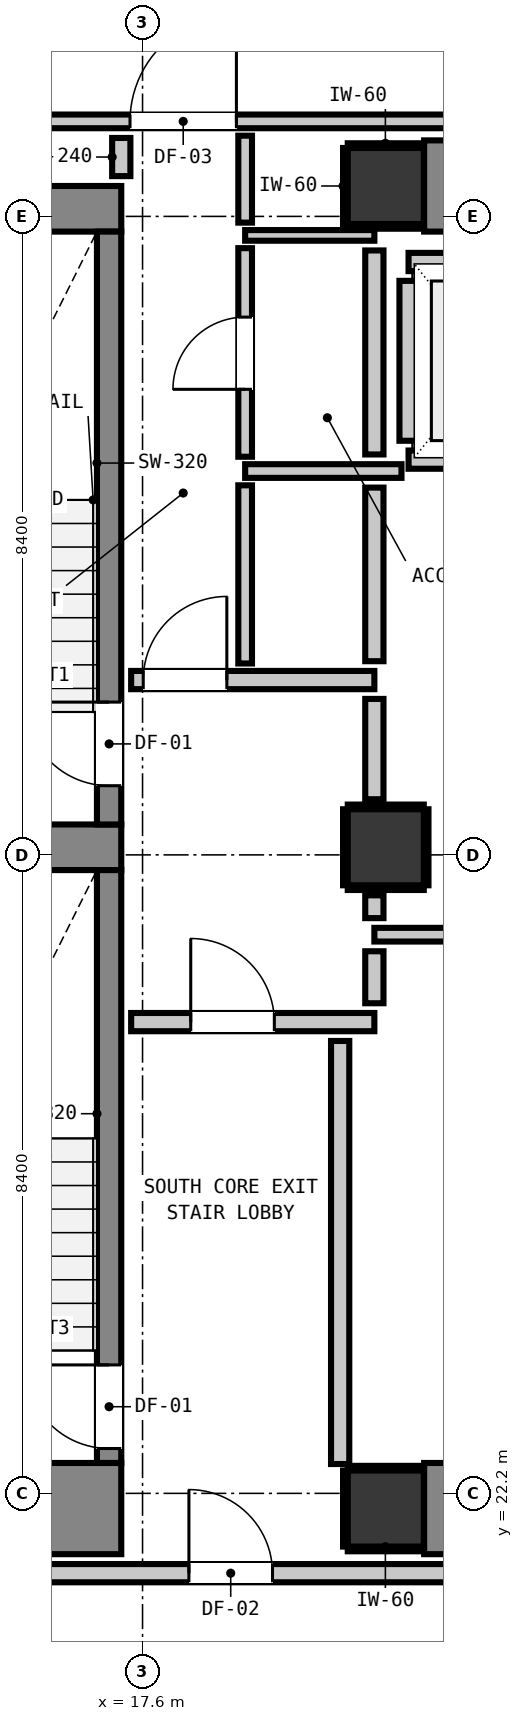
"""IFC4 building model, lengths in metres.
Left out: names, types, materials, properties, quantities, classifications, styles, units other than length and angle.
Written with IfcOpenShell. Run it as: python <this file> out.ifc"""

import sys

from ifc_helpers import new_model, si_unit, direction, frame, frame_2d, origin, origin_2d, place, context, subcontext, project, spatial, rectangle, extrude, element, fill, save


model = new_model("IFC4")
c1 = context("Model", 3, precision=1e-05, world=origin(), true_north=direction((0.0, 1.0)))
c2 = subcontext(c1, "Body", "Model", "MODEL_VIEW")
j1 = project(units=[si_unit("LENGTHUNIT", "METRE"), si_unit("PLANEANGLEUNIT", "RADIAN")], contexts=[c1])
p1 = place(None, origin())
s1 = spatial("IfcSite", under=j1, at=p1, CompositionType="ELEMENT")
p2 = place(p1, origin())
s2 = spatial("IfcBuilding", under=s1, at=p2, CompositionType="ELEMENT")
p3 = place(p2, frame((0.0, 0.0, 58.52)))
s3 = spatial("IfcBuildingStorey", under=s2, at=p3, CompositionType="ELEMENT", Elevation=58.52)
for number, where, z_axis, x_axis in (
    (1, (20.8, 22.0, 0.0), (0.0, 0.0, 1.0), (1.0, 0.0, 0.0)),
    (2, (20.8, 39.4, 0.0), (0.0, 0.0, 1.0), (1.0, 0.0, 0.0)),
):
    element("IfcColumn", number, at=place(p3, frame(where, z_axis=z_axis, x_axis=x_axis)), inside=s3, PredefinedType="COLUMN", context=c2, shape_type="SweptSolid", body=[
        extrude(rectangle(XDim=1.0, YDim=1.0, at=origin_2d()), origin(), (0.0, 0.0, 1.0), 3.32),
    ])
p4 = place(p3, frame((13.24, 22.0, 0.0), z_axis=(0.0, 0.0, 1.0), x_axis=(1.0, 0.0, 0.0)))
e3 = element("IfcWall", 3, at=p4, inside=s3, PredefinedType="SHEAR", context=c2, shape_type="SweptSolid", body=[
    extrude(rectangle(XDim=4.08, YDim=1.2, at=frame_2d((2.04, 0.0))), origin(), (0.0, 0.0, 1.0), 3.32),
])
p5 = place(p3, frame((13.24, 39.1, 0.0), z_axis=(0.0, 0.0, 1.0), x_axis=(1.0, 0.0, 0.0)))
e4 = element("IfcWall", 4, at=p5, inside=s3, PredefinedType="SHEAR", context=c2, shape_type="SweptSolid", body=[
    extrude(rectangle(XDim=4.08, YDim=0.6, at=frame_2d((2.04, 0.0))), origin(), (0.0, 0.0, 1.0), 3.32),
])
p6 = place(p3, frame((13.905, 30.7, 0.0), z_axis=(0.0, 0.0, 1.0), x_axis=(1.0, 0.0, 0.0)))
e5 = element("IfcWall", 5, at=p6, inside=s3, PredefinedType="SHEAR", context=c2, shape_type="SweptSolid", body=[
    extrude(rectangle(XDim=3.415, YDim=0.6, at=frame_2d((1.708, 0.0))), origin(), (0.0, 0.0, 1.0), 3.32),
])
for number, where, z_axis, x_axis in (
    (6, (21.305, 22.0, 0.0), (0.0, 0.0, 1.0), (1.0, 0.0, 0.0)),
    (7, (21.305, 39.4, 0.0), (0.0, 0.0, 1.0), (1.0, 0.0, 0.0)),
):
    element("IfcWall", number, at=place(p3, frame(where, z_axis=z_axis, x_axis=x_axis)), inside=s3, PredefinedType="SHEAR", context=c2, shape_type="SweptSolid", body=[
        extrude(rectangle(XDim=7.39, YDim=1.2, at=frame_2d((3.695, 0.0))), origin(), (0.0, 0.0, 1.0), 3.32),
    ])
p7 = place(p3, frame((17.16, 31.0, 0.0), z_axis=(0.0, 0.0, 1.0), x_axis=(0.0, 1.0, 0.0)))
e8 = element("IfcWall", 8, at=p7, inside=s3, PredefinedType="SHEAR", context=c2, shape_type="SweptSolid", body=[
    extrude(rectangle(XDim=7.8, YDim=0.32, at=frame_2d((3.9, 0.0))), origin(), (0.0, 0.0, 1.0), 3.32),
])
p8 = place(p7, frame((0.51, 0.0, 0.0)))
e9 = element("IfcOpeningElement", 9, at=p8, cuts=e8, PredefinedType="OPENING", context=c2, shape_type="SweptSolid", body=[
    extrude(rectangle(XDim=1.1, YDim=2.15, at=frame_2d((0.55, 1.075))), frame((0.0, 0.17, 0.0), z_axis=(0.0, -1.0, 0.0), x_axis=(1.0, 0.0, 0.0)), (0.0, 0.0, 1.0), 0.34),
])
p9 = place(p3, frame((17.16, 22.6, 0.0), z_axis=(0.0, 0.0, 1.0), x_axis=(0.0, 1.0, 0.0)))
e10 = element("IfcWall", 10, at=p9, inside=s3, PredefinedType="SHEAR", context=c2, shape_type="SweptSolid", body=[
    extrude(rectangle(XDim=7.8, YDim=0.32, at=frame_2d((3.9, 0.0))), origin(), (0.0, 0.0, 1.0), 3.32),
])
p10 = place(p9, frame((0.19, 0.0, 0.0)))
e11 = element("IfcOpeningElement", 11, at=p10, cuts=e10, PredefinedType="OPENING", context=c2, shape_type="SweptSolid", body=[
    extrude(rectangle(XDim=1.1, YDim=2.15, at=frame_2d((0.55, 1.075))), frame((0.0, 0.17, 0.0), z_axis=(0.0, -1.0, 0.0), x_axis=(1.0, 0.0, 0.0)), (0.0, 0.0, 1.0), 0.34),
])
p11 = place(p3, frame((20.8, 30.7, 0.0), z_axis=(0.0, 0.0, 1.0), x_axis=(1.0, 0.0, 0.0)))
e12 = element("IfcColumn", 12, at=p11, inside=s3, PredefinedType="COLUMN", context=c2, shape_type="SweptSolid", body=[
    extrude(rectangle(XDim=1.0, YDim=1.0, at=origin_2d()), origin(), (0.0, 0.0, 1.0), 3.32),
])
for number, where, z_axis, x_axis in (
    (13, (21.1, 35.8, 0.0), (0.0, 0.0, 1.0), (1.0, 0.0, 0.0)),
    (14, (21.1, 38.4, 0.0), (0.0, 0.0, 1.0), (1.0, 0.0, 0.0)),
):
    element("IfcWall", number, at=place(p3, frame(where, z_axis=z_axis, x_axis=x_axis)), inside=s3, PredefinedType="PARTITIONING", context=c2, shape_type="SweptSolid", body=[
        extrude(rectangle(XDim=2.2, YDim=0.24, at=frame_2d((1.1, 0.0))), origin(), (0.0, 0.0, 1.0), 2.9),
    ])
p12 = place(p3, frame((21.1, 36.048, 0.0), z_axis=(0.0, 0.0, 1.0), x_axis=(0.0, 1.0, 0.0)))
e15 = element("IfcWall", 15, at=p12, inside=s3, PredefinedType="PARTITIONING", context=c2, shape_type="SweptSolid", body=[
    extrude(rectangle(XDim=2.104, YDim=0.24, at=frame_2d((1.052, 0.0))), origin(), (0.0, 0.0, 1.0), 0.905),
])
p13 = place(p3, frame((10.15, 21.15, 0.0), z_axis=(0.0, 0.0, 1.0), x_axis=(1.0, 0.0, 0.0)))
e16 = element("IfcWall", 16, at=p13, inside=s3, PredefinedType="PARTITIONING", context=c2, shape_type="SweptSolid", body=[
    extrude(rectangle(XDim=40.023, YDim=0.24, at=frame_2d((20.012, 0.0))), origin(), (0.0, 0.0, 1.0), 2.9),
])
p14 = place(p13, frame((8.06, 0.0, 0.0)))
e17 = element("IfcOpeningElement", 17, at=p14, cuts=e16, PredefinedType="OPENING", context=c2, shape_type="SweptSolid", body=[
    extrude(rectangle(XDim=1.1, YDim=2.15, at=frame_2d((0.55, 1.075))), frame((0.0, 0.13, 0.0), z_axis=(0.0, -1.0, 0.0), x_axis=(1.0, 0.0, 0.0)), (0.0, 0.0, 1.0), 0.26),
])
p15 = place(p13, frame((0.324, 0.0, 0.0)))
e18 = element("IfcOpeningElement", 18, at=p15, cuts=e16, PredefinedType="OPENING", context=c2, shape_type="SweptSolid", body=[
    extrude(rectangle(XDim=1.4, YDim=2.15, at=frame_2d((0.7, 1.075))), frame((0.0, 0.13, 0.0), z_axis=(0.0, -1.0, 0.0), x_axis=(1.0, 0.0, 0.0)), (0.0, 0.0, 1.0), 0.26),
])
p16 = place(p13, frame((31.825, 0.0, 0.0)))
e19 = element("IfcOpeningElement", 19, at=p16, cuts=e16, PredefinedType="OPENING", context=c2, shape_type="SweptSolid", body=[
    extrude(rectangle(XDim=1.0, YDim=2.15, at=frame_2d((0.5, 1.075))), frame((0.0, 0.13, 0.0), z_axis=(0.0, -1.0, 0.0), x_axis=(1.0, 0.0, 0.0)), (0.0, 0.0, 1.0), 0.26),
])
p17 = place(p3, frame((17.45, 28.4, 0.0), z_axis=(0.0, 0.0, 1.0), x_axis=(1.0, 0.0, 0.0)))
e20 = element("IfcWall", 20, at=p17, inside=s3, PredefinedType="PARTITIONING", context=c2, shape_type="SweptSolid", body=[
    extrude(rectangle(XDim=3.2, YDim=0.24, at=frame_2d((1.6, 0.0))), origin(), (0.0, 0.0, 1.0), 2.9),
])
p18 = place(p17, frame((0.784, 0.0, 0.0)))
e21 = element("IfcOpeningElement", 21, at=p18, cuts=e20, PredefinedType="OPENING", context=c2, shape_type="SweptSolid", body=[
    extrude(rectangle(XDim=1.1, YDim=2.15, at=frame_2d((0.55, 1.075))), frame((0.0, 0.13, 0.0), z_axis=(0.0, -1.0, 0.0), x_axis=(1.0, 0.0, 0.0)), (0.0, 0.0, 1.0), 0.26),
])
p19 = place(p3, frame((17.45, 32.9, 0.0), z_axis=(0.0, 0.0, 1.0), x_axis=(1.0, 0.0, 0.0)))
e22 = element("IfcWall", 22, at=p19, inside=s3, PredefinedType="PARTITIONING", context=c2, shape_type="SweptSolid", body=[
    extrude(rectangle(XDim=3.2, YDim=0.24, at=frame_2d((1.6, 0.0))), origin(), (0.0, 0.0, 1.0), 2.9),
])
p20 = place(p19, frame((0.159, 0.0, 0.0)))
e23 = element("IfcOpeningElement", 23, at=p20, cuts=e22, PredefinedType="OPENING", context=c2, shape_type="SweptSolid", body=[
    extrude(rectangle(XDim=1.1, YDim=2.15, at=frame_2d((0.55, 1.075))), frame((0.0, 0.13, 0.0), z_axis=(0.0, -1.0, 0.0), x_axis=(1.0, 0.0, 0.0)), (0.0, 0.0, 1.0), 0.26),
])
p21 = place(p3, frame((20.65, 29.55, 0.0), z_axis=(0.0, 0.0, 1.0), x_axis=(1.0, 0.0, 0.0)))
e24 = element("IfcWall", 24, at=p21, inside=s3, PredefinedType="PARTITIONING", context=c2, shape_type="SweptSolid", body=[
    extrude(rectangle(XDim=9.325, YDim=0.18, at=frame_2d((4.663, 0.0))), origin(), (0.0, 0.0, 1.0), 2.9),
])
p22 = place(p3, frame((18.95, 35.65, 0.0), z_axis=(0.0, 0.0, 1.0), x_axis=(1.0, 0.0, 0.0)))
e25 = element("IfcWall", 25, at=p22, inside=s3, PredefinedType="PARTITIONING", context=c2, shape_type="SweptSolid", body=[
    extrude(rectangle(XDim=2.057, YDim=0.18, at=frame_2d((1.029, 0.0))), origin(), (0.0, 0.0, 1.0), 2.9),
])
p23 = place(p3, frame((8.027, 40.25, 0.0), z_axis=(0.0, 0.0, 1.0), x_axis=(1.0, 0.0, 0.0)))
e26 = element("IfcWall", 26, at=p23, inside=s3, PredefinedType="PARTITIONING", context=c2, shape_type="SweptSolid", body=[
    extrude(rectangle(XDim=42.146, YDim=0.18, at=frame_2d((21.073, 0.0))), origin(), (0.0, 0.0, 1.0), 2.9),
])
p24 = place(p23, frame((9.408, 0.0, 0.0)))
e27 = element("IfcOpeningElement", 27, at=p24, cuts=e26, PredefinedType="OPENING", context=c2, shape_type="SweptSolid", body=[
    extrude(rectangle(XDim=1.4, YDim=2.15, at=frame_2d((0.7, 1.075))), frame((0.0, 0.1, 0.0), z_axis=(0.0, -1.0, 0.0), x_axis=(1.0, 0.0, 0.0)), (0.0, 0.0, 1.0), 0.2),
])
p25 = place(p23, frame((2.447, 0.0, 0.0)))
e28 = element("IfcOpeningElement", 28, at=p25, cuts=e26, PredefinedType="OPENING", context=c2, shape_type="SweptSolid", body=[
    extrude(rectangle(XDim=1.4, YDim=2.15, at=frame_2d((0.7, 1.075))), frame((0.0, 0.1, 0.0), z_axis=(0.0, -1.0, 0.0), x_axis=(1.0, 0.0, 0.0)), (0.0, 0.0, 1.0), 0.2),
])
p26 = place(p23, frame((35.474, 0.0, 0.0)))
e29 = element("IfcOpeningElement", 29, at=p26, cuts=e26, PredefinedType="OPENING", context=c2, shape_type="SweptSolid", body=[
    extrude(rectangle(XDim=0.9, YDim=2.1, at=frame_2d((0.45, 1.05))), frame((0.0, 0.1, 0.0), z_axis=(0.0, -1.0, 0.0), x_axis=(1.0, 0.0, 0.0)), (0.0, 0.0, 1.0), 0.2),
])
p27 = place(p3, frame((18.95, 38.75, 0.0), z_axis=(0.0, 0.0, 1.0), x_axis=(1.0, 0.0, 0.0)))
e30 = element("IfcWall", 30, at=p27, inside=s3, PredefinedType="PARTITIONING", context=c2, shape_type="SweptSolid", body=[
    extrude(rectangle(XDim=1.7, YDim=0.14, at=frame_2d((0.85, 0.0))), origin(), (0.0, 0.0, 1.0), 0.905),
])
p28 = place(p3, frame((17.32, 39.53, 0.0), z_axis=(0.0, 0.0, 1.0), x_axis=(0.0, 1.0, 0.0)))
e31 = element("IfcWall", 31, at=p28, inside=s3, PredefinedType="PARTITIONING", context=c2, shape_type="SweptSolid", body=[
    extrude(rectangle(XDim=0.502, YDim=0.24, at=frame_2d((0.251, 0.0))), origin(), (0.0, 0.0, 1.0), 2.9),
])
p29 = place(p3, frame((20.2, 22.586, 0.0), z_axis=(0.0, 0.0, 1.0), x_axis=(0.0, 1.0, 0.0)))
e32 = element("IfcWall", 32, at=p29, inside=s3, PredefinedType="PARTITIONING", context=c2, shape_type="SweptSolid", body=[
    extrude(rectangle(XDim=5.566, YDim=0.24, at=frame_2d((2.783, 0.0))), origin(), (0.0, 0.0, 1.0), 0.905),
])
p30 = place(p3, frame((20.65, 28.648, 0.0), z_axis=(0.0, 0.0, 1.0), x_axis=(0.0, 1.0, 0.0)))
e33 = element("IfcWall", 33, at=p30, inside=s3, PredefinedType="PARTITIONING", context=c2, shape_type="SweptSolid", body=[
    extrude(rectangle(XDim=0.684, YDim=0.24, at=frame_2d((0.342, 0.0))), origin(), (0.0, 0.0, 1.0), 0.905),
])
p31 = place(p3, frame((20.65, 29.768, 0.0), z_axis=(0.0, 0.0, 1.0), x_axis=(0.0, 1.0, 0.0)))
e34 = element("IfcWall", 34, at=p31, inside=s3, PredefinedType="PARTITIONING", context=c2, shape_type="SweptSolid", body=[
    extrude(rectangle(XDim=0.3, YDim=0.24, at=frame_2d((0.15, 0.0))), origin(), (0.0, 0.0, 1.0), 0.905),
])
p32 = place(p3, frame((20.65, 31.332, 0.0), z_axis=(0.0, 0.0, 1.0), x_axis=(0.0, 1.0, 0.0)))
e35 = element("IfcWall", 35, at=p32, inside=s3, PredefinedType="PARTITIONING", context=c2, shape_type="SweptSolid", body=[
    extrude(rectangle(XDim=1.32, YDim=0.24, at=frame_2d((0.66, 0.0))), origin(), (0.0, 0.0, 1.0), 0.905),
])
p33 = place(p3, frame((20.65, 33.148, 0.0), z_axis=(0.0, 0.0, 1.0), x_axis=(0.0, 1.0, 0.0)))
e36 = element("IfcWall", 36, at=p33, inside=s3, PredefinedType="PARTITIONING", context=c2, shape_type="SweptSolid", body=[
    extrude(rectangle(XDim=2.284, YDim=0.24, at=frame_2d((1.142, 0.0))), origin(), (0.0, 0.0, 1.0), 0.905),
])
p34 = place(p3, frame((20.65, 35.868, 0.0), z_axis=(0.0, 0.0, 1.0), x_axis=(0.0, 1.0, 0.0)))
e37 = element("IfcWall", 37, at=p34, inside=s3, PredefinedType="PARTITIONING", context=c2, shape_type="SweptSolid", body=[
    extrude(rectangle(XDim=2.684, YDim=0.24, at=frame_2d((1.342, 0.0))), origin(), (0.0, 0.0, 1.0), 0.905),
])
p35 = place(p3, frame((18.95, 33.118, 0.0), z_axis=(0.0, 0.0, 1.0), x_axis=(0.0, 1.0, 0.0)))
e38 = element("IfcWall", 38, at=p35, inside=s3, PredefinedType="PARTITIONING", context=c2, shape_type="SweptSolid", body=[
    extrude(rectangle(XDim=2.344, YDim=0.18, at=frame_2d((1.172, 0.0))), origin(), (0.0, 0.0, 1.0), 2.9),
])
p36 = place(p3, frame((18.95, 35.838, 0.0), z_axis=(0.0, 0.0, 1.0), x_axis=(0.0, 1.0, 0.0)))
e39 = element("IfcWall", 39, at=p36, inside=s3, PredefinedType="PARTITIONING", context=c2, shape_type="SweptSolid", body=[
    extrude(rectangle(XDim=2.744, YDim=0.18, at=frame_2d((1.372, 0.0))), origin(), (0.0, 0.0, 1.0), 2.9),
])
p37 = place(p36, frame((0.887, 0.0, 0.0)))
e40 = element("IfcOpeningElement", 40, at=p37, cuts=e39, PredefinedType="OPENING", context=c2, shape_type="SweptSolid", body=[
    extrude(rectangle(XDim=0.95, YDim=2.1, at=frame_2d((0.475, 1.05))), frame((0.0, 0.1, 0.0), z_axis=(0.0, -1.0, 0.0), x_axis=(1.0, 0.0, 0.0)), (0.0, 0.0, 1.0), 0.2),
])
p38 = place(p3, frame((18.95, 38.918, 0.0), z_axis=(0.0, 0.0, 1.0), x_axis=(0.0, 1.0, 0.0)))
e41 = element("IfcWall", 41, at=p38, inside=s3, PredefinedType="PARTITIONING", context=c2, shape_type="SweptSolid", body=[
    extrude(rectangle(XDim=1.144, YDim=0.18, at=frame_2d((0.572, 0.0))), origin(), (0.0, 0.0, 1.0), 2.9),
])
for number, where, z_axis, x_axis in (
    (42, (20.3, 21.468, 0.0), (0.0, 0.0, 1.0), (1.0, 0.0, 0.0)),
    (43, (20.3, 22.532, 0.0), (0.0, 0.0, 1.0), (1.0, 0.0, 0.0)),
):
    element("IfcWall", number, at=place(p3, frame(where, z_axis=z_axis, x_axis=x_axis)), inside=s3, PredefinedType="PARTITIONING", context=c2, shape_type="SweptSolid", body=[
        extrude(rectangle(XDim=0.99, YDim=0.06, at=frame_2d((0.495, 0.0))), origin(), (0.0, 0.0, 1.0), 0.905),
    ])
p39 = place(p3, frame((20.268, 21.5, 0.0), z_axis=(0.0, 0.0, 1.0), x_axis=(0.0, 1.0, 0.0)))
e44 = element("IfcWall", 44, at=p39, inside=s3, PredefinedType="PARTITIONING", context=c2, shape_type="SweptSolid", body=[
    extrude(rectangle(XDim=1.0, YDim=0.06, at=frame_2d((0.5, 0.0))), origin(), (0.0, 0.0, 1.0), 0.905),
])
for number, where, z_axis, x_axis in (
    (45, (20.3, 38.868, 0.0), (0.0, 0.0, 1.0), (1.0, 0.0, 0.0)),
    (46, (20.3, 39.932, 0.0), (0.0, 0.0, 1.0), (1.0, 0.0, 0.0)),
):
    element("IfcWall", number, at=place(p3, frame(where, z_axis=z_axis, x_axis=x_axis)), inside=s3, PredefinedType="PARTITIONING", context=c2, shape_type="SweptSolid", body=[
        extrude(rectangle(XDim=0.99, YDim=0.06, at=frame_2d((0.495, 0.0))), origin(), (0.0, 0.0, 1.0), 0.905),
    ])
for number, where, z_axis, x_axis in (
    (47, (20.268, 38.9, 0.0), (0.0, 0.0, 1.0), (0.0, 1.0, 0.0)),
    (48, (20.3, 30.168, 0.0), (0.0, 0.0, 1.0), (1.0, 0.0, 0.0)),
    (49, (20.3, 31.232, 0.0), (0.0, 0.0, 1.0), (1.0, 0.0, 0.0)),
    (50, (20.268, 30.2, 0.0), (0.0, 0.0, 1.0), (0.0, 1.0, 0.0)),
    (51, (21.332, 30.2, 0.0), (0.0, 0.0, 1.0), (0.0, 1.0, 0.0)),
):
    element("IfcWall", number, at=place(p3, frame(where, z_axis=z_axis, x_axis=x_axis)), inside=s3, PredefinedType="PARTITIONING", context=c2, shape_type="SweptSolid", body=[
        extrude(rectangle(XDim=1.0, YDim=0.06, at=frame_2d((0.5, 0.0))), origin(), (0.0, 0.0, 1.0), 0.905),
    ])
p40 = place(p8, origin())
e52 = element("IfcDoor", 52, at=p40, inside=s3, OperationType="SINGLE_SWING_RIGHT", PredefinedType="DOOR", context=c2, shape_type="SweptSolid", body=[
    extrude(rectangle(XDim=1.1, YDim=2.15, at=frame_2d((0.55, 1.075))), frame((0.0, 0.025, 0.0), z_axis=(0.0, -1.0, 0.0), x_axis=(1.0, 0.0, 0.0)), (0.0, 0.0, 1.0), 0.05),
])
fill(e9, e52)
p41 = place(p10, origin())
e53 = element("IfcDoor", 53, at=p41, inside=s3, OperationType="SINGLE_SWING_RIGHT", PredefinedType="DOOR", context=c2, shape_type="SweptSolid", body=[
    extrude(rectangle(XDim=1.1, YDim=2.15, at=frame_2d((0.55, 1.075))), frame((0.0, 0.025, 0.0), z_axis=(0.0, -1.0, 0.0), x_axis=(1.0, 0.0, 0.0)), (0.0, 0.0, 1.0), 0.05),
])
fill(e11, e53)
p42 = place(p18, origin())
e54 = element("IfcDoor", 54, at=p42, inside=s3, OperationType="SINGLE_SWING_LEFT", PredefinedType="DOOR", context=c2, shape_type="SweptSolid", body=[
    extrude(rectangle(XDim=1.1, YDim=2.15, at=frame_2d((0.55, 1.075))), frame((0.0, 0.025, 0.0), z_axis=(0.0, -1.0, 0.0), x_axis=(1.0, 0.0, 0.0)), (0.0, 0.0, 1.0), 0.05),
])
fill(e21, e54)
p43 = place(p20, origin())
e55 = element("IfcDoor", 55, at=p43, inside=s3, OperationType="SINGLE_SWING_RIGHT", PredefinedType="DOOR", context=c2, shape_type="SweptSolid", body=[
    extrude(rectangle(XDim=1.1, YDim=2.15, at=frame_2d((0.55, 1.075))), frame((0.0, 0.025, 0.0), z_axis=(0.0, -1.0, 0.0), x_axis=(1.0, 0.0, 0.0)), (0.0, 0.0, 1.0), 0.05),
])
fill(e23, e55)
p44 = place(p14, origin())
e56 = element("IfcDoor", 56, at=p44, inside=s3, OperationType="SINGLE_SWING_LEFT", PredefinedType="DOOR", context=c2, shape_type="SweptSolid", body=[
    extrude(rectangle(XDim=1.1, YDim=2.15, at=frame_2d((0.55, 1.075))), frame((0.0, 0.025, 0.0), z_axis=(0.0, -1.0, 0.0), x_axis=(1.0, 0.0, 0.0)), (0.0, 0.0, 1.0), 0.05),
])
fill(e17, e56)
p45 = place(p24, origin())
e57 = element("IfcDoor", 57, at=p45, inside=s3, OperationType="SINGLE_SWING_RIGHT", PredefinedType="DOOR", context=c2, shape_type="SweptSolid", body=[
    extrude(rectangle(XDim=1.4, YDim=2.15, at=frame_2d((0.7, 1.075))), frame((0.0, 0.025, 0.0), z_axis=(0.0, -1.0, 0.0), x_axis=(1.0, 0.0, 0.0)), (0.0, 0.0, 1.0), 0.05),
])
fill(e27, e57)
p46 = place(p37, origin())
e58 = element("IfcDoor", 58, at=p46, inside=s3, OperationType="SINGLE_SWING_LEFT", PredefinedType="DOOR", context=c2, shape_type="SweptSolid", body=[
    extrude(rectangle(XDim=0.95, YDim=2.1, at=frame_2d((0.475, 1.05))), frame((0.0, 0.025, 0.0), z_axis=(0.0, -1.0, 0.0), x_axis=(1.0, 0.0, 0.0)), (0.0, 0.0, 1.0), 0.05),
])
fill(e40, e58)
save(model, sys.argv[1])
